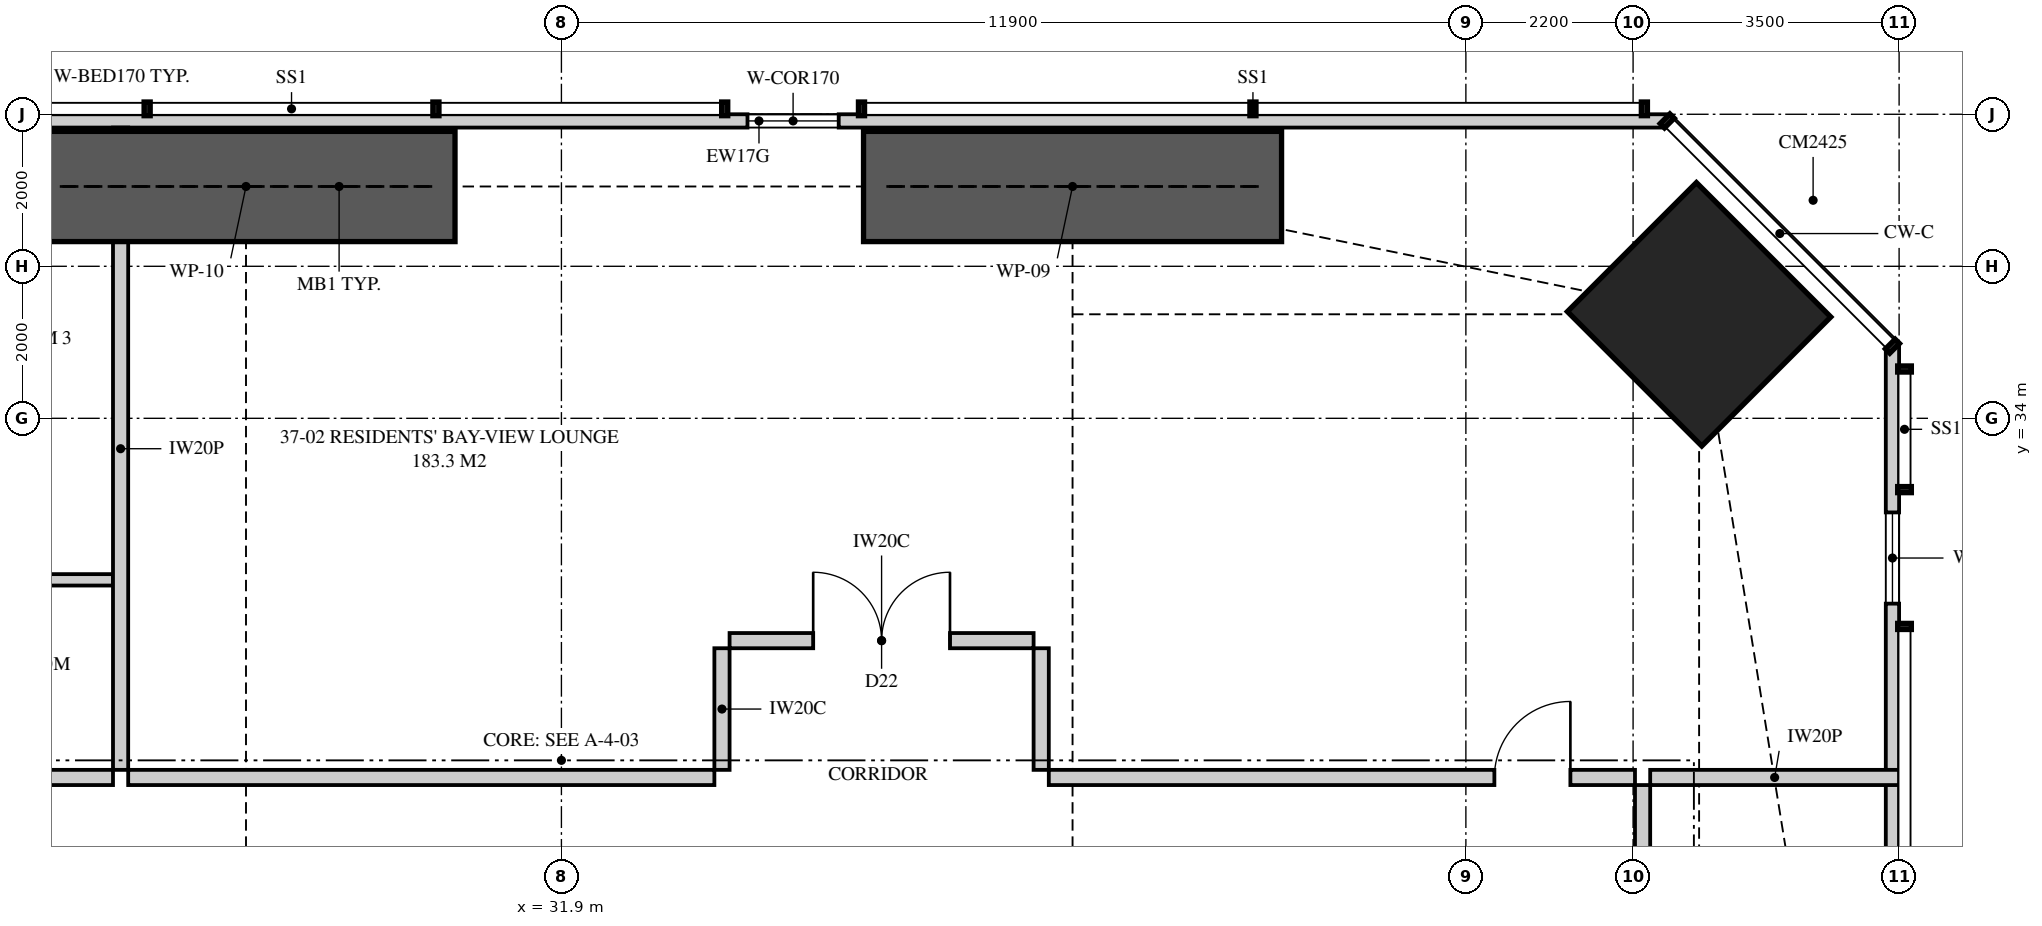
"""IFC4 building model, lengths in metres.
Left out: names, types, materials, properties, quantities, classifications, styles, units other than length and angle.
Written with IfcOpenShell. Run it as: python <this file> out.ifc"""

import sys

from ifc_helpers import new_model, si_unit, direction, frame, frame_2d, origin, origin_2d, place, context, subcontext, project, spatial, polyline, rectangle, outline, extrude, element, fill, save


model = new_model("IFC4")
c1 = context("Model", 3, precision=1e-05, world=origin(), true_north=direction((0.0, 1.0)))
c2 = subcontext(c1, "Body", "Model", "MODEL_VIEW")
j1 = project(units=[si_unit("LENGTHUNIT", "METRE"), si_unit("PLANEANGLEUNIT", "RADIAN")], contexts=[c1])
p1 = place(None, origin())
s1 = spatial("IfcSite", under=j1, at=p1, CompositionType="ELEMENT")
p2 = place(p1, origin())
s2 = spatial("IfcBuilding", under=s1, at=p2, CompositionType="ELEMENT")
p3 = place(p2, frame((0.0, 0.0, 135.0)))
s3 = spatial("IfcBuildingStorey", under=s2, at=p3, CompositionType="ELEMENT", Elevation=135.0)
p4 = place(p3, frame((46.869, 35.369, 0.0), z_axis=(0.0, 0.0, 1.0), x_axis=(-0.707106781187, -0.707106781187, 0.0)))
e1 = element("IfcColumn", 1, at=p4, inside=s3, PredefinedType="COLUMN", context=c2, shape_type="SweptSolid", body=[
    extrude(rectangle(XDim=2.4, YDim=2.5, at=origin_2d()), origin(), (0.0, 0.0, 1.0), 3.35),
])
p5 = place(p3, frame((49.413, 3.051, 0.0), z_axis=(0.0, 0.0, 1.0), x_axis=(0.0, 1.0, 0.0)))
e2 = element("IfcWall", 2, at=p5, inside=s3, PredefinedType="SOLIDWALL", context=c2, shape_type="SweptSolid", body=[
    extrude(outline(polyline([(0.0, 0.0), (31.897, 0.0), (31.897, 3.11), (22.167, 3.11), (22.167, 2.15), (22.074, 2.15), (22.074, 3.11), (21.949, 3.11), (21.949, 2.15), (9.949, 2.15), (9.949, 3.11), (9.823, 3.11), (9.823, 2.15), (9.73, 2.15), (9.73, 3.11), (0.0, 3.11), (0.0, 0.0)])), frame((0.0, 0.087, 0.0), z_axis=(0.0, -1.0, 0.0), x_axis=(1.0, 0.0, 0.0)), (0.0, 0.0, 1.0), 0.175),
])
p6 = place(p5, frame((2.118, 0.0, 0.4)))
e3 = element("IfcOpeningElement", 3, at=p6, cuts=e2, PredefinedType="OPENING", context=c2, shape_type="SweptSolid", body=[
    extrude(rectangle(XDim=1.8, YDim=1.7, at=frame_2d((0.9, 0.85))), frame((0.0, 0.097, 0.0), z_axis=(0.0, -1.0, 0.0), x_axis=(1.0, 0.0, 0.0)), (0.0, 0.0, 1.0), 0.195),
])
p7 = place(p5, frame((14.849, 0.0, 0.4)))
e4 = element("IfcOpeningElement", 4, at=p7, cuts=e2, PredefinedType="OPENING", context=c2, shape_type="SweptSolid", body=[
    extrude(rectangle(XDim=1.2, YDim=1.7, at=frame_2d((0.6, 0.85))), frame((0.0, 0.097, 0.0), z_axis=(0.0, -1.0, 0.0), x_axis=(1.0, 0.0, 0.0)), (0.0, 0.0, 1.0), 0.195),
])
p8 = place(p5, frame((28.51, 0.0, 0.4)))
e5 = element("IfcOpeningElement", 5, at=p8, cuts=e2, PredefinedType="OPENING", context=c2, shape_type="SweptSolid", body=[
    extrude(rectangle(XDim=1.2, YDim=1.7, at=frame_2d((0.6, 0.85))), frame((0.0, 0.097, 0.0), z_axis=(0.0, -1.0, 0.0), x_axis=(1.0, 0.0, 0.0)), (0.0, 0.0, 1.0), 0.195),
])
p9 = place(p3, frame((46.449, 37.913, 0.0), z_axis=(0.0, 0.0, 1.0), x_axis=(-1.0, 0.0, 0.0)))
e6 = element("IfcWall", 6, at=p9, inside=s3, PredefinedType="SOLIDWALL", context=c2, shape_type="SweptSolid", body=[
    extrude(outline(polyline([(0.0, 0.0), (23.899, 0.0), (23.899, 2.15), (7.824, 2.15), (7.824, 3.11), (7.666, 3.11), (7.666, 2.15), (7.62, 2.15), (7.62, 3.11), (0.0, 3.11), (0.0, 0.0)])), frame((0.0, 0.087, 0.0), z_axis=(0.0, -1.0, 0.0), x_axis=(1.0, 0.0, 0.0)), (0.0, 0.0, 1.0), 0.175),
])
p10 = place(p9, frame((10.9, 0.0, 0.4)))
e7 = element("IfcOpeningElement", 7, at=p10, cuts=e6, PredefinedType="OPENING", context=c2, shape_type="SweptSolid", body=[
    extrude(rectangle(XDim=1.2, YDim=1.7, at=frame_2d((0.6, 0.85))), frame((0.0, 0.097, 0.0), z_axis=(0.0, -1.0, 0.0), x_axis=(1.0, 0.0, 0.0)), (0.0, 0.0, 1.0), 0.195),
])
p11 = place(p9, frame((21.559, 0.0, 0.4)))
e8 = element("IfcOpeningElement", 8, at=p11, cuts=e6, PredefinedType="OPENING", context=c2, shape_type="SweptSolid", body=[
    extrude(rectangle(XDim=1.8, YDim=1.7, at=frame_2d((0.9, 0.85))), frame((0.0, 0.097, 0.0), z_axis=(0.0, -1.0, 0.0), x_axis=(1.0, 0.0, 0.0)), (0.0, 0.0, 1.0), 0.195),
])
p12 = place(p3, frame((26.1, 37.825, 0.0), z_axis=(0.0, 0.0, 1.0), x_axis=(0.0, -1.0, 0.0)))
e9 = element("IfcWall", 9, at=p12, inside=s3, PredefinedType="PARTITIONING", context=c2, shape_type="SweptSolid", body=[
    extrude(outline(polyline([(0.529, 2.15), (0.0, 2.15), (0.0, 0.0), (0.529, 0.0), (0.529, 0.376), (1.021, 0.376), (1.021, 0.0), (8.45, 0.0), (8.45, 3.11), (1.685, 3.11), (1.685, 2.15), (1.021, 2.15), (1.021, 1.774), (0.529, 1.774), (0.529, 2.15)])), frame((0.0, 0.1, 0.0), z_axis=(0.0, -1.0, 0.0), x_axis=(1.0, 0.0, 0.0)), (0.0, 0.0, 1.0), 0.2),
])
p13 = place(p3, frame((17.775, 29.275, 0.0), z_axis=(0.0, 0.0, 1.0), x_axis=(1.0, 0.0, 0.0)))
e10 = element("IfcWall", 10, at=p13, inside=s3, PredefinedType="PARTITIONING", context=c2, shape_type="SweptSolid", body=[
    extrude(rectangle(XDim=8.225, YDim=0.2, at=frame_2d((4.113, 0.0))), origin(), (0.0, 0.0, 1.0), 3.11),
])
p14 = place(p13, frame((0.2, 0.0, 0.0)))
e11 = element("IfcOpeningElement", 11, at=p14, cuts=e10, PredefinedType="OPENING", context=c2, shape_type="SweptSolid", body=[
    extrude(rectangle(XDim=1.05, YDim=2.2, at=frame_2d((0.525, 1.1))), frame((0.0, 0.11, 0.0), z_axis=(0.0, -1.0, 0.0), x_axis=(1.0, 0.0, 0.0)), (0.0, 0.0, 1.0), 0.22),
])
p15 = place(p3, frame((22.65, 31.875, 0.0), z_axis=(0.0, 0.0, 1.0), x_axis=(1.0, 0.0, 0.0)))
e12 = element("IfcWall", 12, at=p15, inside=s3, PredefinedType="PLUMBINGWALL", context=c2, shape_type="SweptSolid", body=[
    extrude(rectangle(XDim=3.35, YDim=0.15, at=frame_2d((1.675, 0.0))), origin(), (0.0, 0.0, 1.0), 3.11),
])
p16 = place(p3, frame((26.2, 29.275, 0.0), z_axis=(0.0, 0.0, 1.0), x_axis=(1.0, 0.0, 0.0)))
e13 = element("IfcWall", 13, at=p16, inside=s3, PredefinedType="PARTITIONING", context=c2, shape_type="SweptSolid", body=[
    extrude(outline(polyline([(0.0, 0.0), (7.713, 0.0), (7.712, 3.11), (1.887, 3.11), (1.887, 2.541), (1.213, 2.541), (1.213, 3.11), (0.0, 3.11), (0.0, 0.0)])), frame((0.0, 0.1, 0.0), z_axis=(0.0, -1.0, 0.0), x_axis=(1.0, 0.0, 0.0)), (0.0, 0.0, 1.0), 0.2),
])
p17 = place(p3, frame((46.225, 29.275, 0.0), z_axis=(0.0, 0.0, 1.0), x_axis=(1.0, 0.0, 0.0)))
e14 = element("IfcWall", 14, at=p17, inside=s3, PredefinedType="PARTITIONING", context=c2, shape_type="SweptSolid", body=[
    extrude(outline(polyline([(0.0, 0.0), (3.275, 0.0), (3.275, 3.11), (2.554, 3.11), (2.554, 2.15), (0.805, 2.15), (0.805, 2.541), (0.306, 2.541), (0.306, 3.11), (0.0, 3.11), (0.0, 0.0)])), frame((0.0, 0.1, 0.0), z_axis=(0.0, -1.0, 0.0), x_axis=(1.0, 0.0, 0.0)), (0.0, 0.0, 1.0), 0.2),
])
p18 = place(p3, frame((46.125, 7.825, 0.0), z_axis=(0.0, 0.0, 1.0), x_axis=(0.0, 1.0, 0.0)))
e15 = element("IfcWall", 15, at=p18, inside=s3, PredefinedType="PARTITIONING", context=c2, shape_type="SweptSolid", body=[
    extrude(outline(polyline([(0.0, 0.0), (21.35, 0.0), (21.35, 3.11), (17.512, 3.11), (17.512, 2.541), (16.838, 2.541), (16.838, 3.11), (5.512, 3.11), (5.512, 2.541), (4.838, 2.541), (4.838, 3.11), (0.0, 3.11), (0.0, 0.0)])), frame((0.0, 0.1, 0.0), z_axis=(0.0, -1.0, 0.0), x_axis=(1.0, 0.0, 0.0)), (0.0, 0.0, 1.0), 0.2),
])
p19 = place(p18, frame((9.775, 0.0, 0.0)))
e16 = element("IfcOpeningElement", 16, at=p19, cuts=e15, PredefinedType="OPENING", context=c2, shape_type="SweptSolid", body=[
    extrude(rectangle(XDim=1.8, YDim=2.1, at=frame_2d((0.9, 1.05))), frame((0.0, 0.11, 0.0), z_axis=(0.0, -1.0, 0.0), x_axis=(1.0, 0.0, 0.0)), (0.0, 0.0, 1.0), 0.22),
])
p20 = place(p18, frame((19.5, 0.0, 0.0)))
e17 = element("IfcOpeningElement", 17, at=p20, cuts=e15, PredefinedType="OPENING", context=c2, shape_type="SweptSolid", body=[
    extrude(rectangle(XDim=1.0, YDim=2.1, at=frame_2d((0.5, 1.05))), frame((0.0, 0.11, 0.0), z_axis=(0.0, -1.0, 0.0), x_axis=(1.0, 0.0, 0.0)), (0.0, 0.0, 1.0), 0.22),
])
p21 = place(p3, frame((38.312, 29.275, 0.0), z_axis=(0.0, 0.0, 1.0), x_axis=(1.0, 0.0, 0.0)))
e18 = element("IfcWall", 18, at=p21, inside=s3, PredefinedType="PARTITIONING", context=c2, shape_type="SweptSolid", body=[
    extrude(outline(polyline([(0.0, 0.0), (7.712, 0.0), (7.712, 3.11), (0.65, 3.11), (0.65, 2.541), (0.0, 2.541), (0.0, 3.11), (0.0, 0.0)])), frame((0.0, 0.1, 0.0), z_axis=(0.0, -1.0, 0.0), x_axis=(1.0, 0.0, 0.0)), (0.0, 0.0, 1.0), 0.2),
])
p22 = place(p21, frame((5.863, 0.0, 0.0)))
e19 = element("IfcOpeningElement", 19, at=p22, cuts=e18, PredefinedType="OPENING", context=c2, shape_type="SweptSolid", body=[
    extrude(rectangle(XDim=1.0, YDim=2.1, at=frame_2d((0.5, 1.05))), frame((0.0, 0.11, 0.0), z_axis=(0.0, -1.0, 0.0), x_axis=(1.0, 0.0, 0.0)), (0.0, 0.0, 1.0), 0.22),
])
p23 = place(p3, frame((34.113, 31.075, 0.0), z_axis=(0.0, 0.0, 1.0), x_axis=(1.0, 0.0, 0.0)))
e20 = element("IfcWall", 20, at=p23, inside=s3, PredefinedType="PARTITIONING", context=c2, shape_type="SweptSolid", body=[
    extrude(rectangle(XDim=4.0, YDim=0.2, at=frame_2d((2.0, 0.0))), origin(), (0.0, 0.0, 1.0), 3.11),
])
p24 = place(p23, frame((1.1, 0.0, 0.0)))
e21 = element("IfcOpeningElement", 21, at=p24, cuts=e20, PredefinedType="OPENING", context=c2, shape_type="SweptSolid", body=[
    extrude(rectangle(XDim=1.8, YDim=2.1, at=frame_2d((0.9, 1.05))), frame((0.0, 0.11, 0.0), z_axis=(0.0, -1.0, 0.0), x_axis=(1.0, 0.0, 0.0)), (0.0, 0.0, 1.0), 0.22),
])
for number, where, z_axis, x_axis in (
    (22, (34.012, 29.375, 0.0), (0.0, 0.0, 1.0), (0.0, 1.0, 0.0)),
    (23, (38.212, 29.375, 0.0), (0.0, 0.0, 1.0), (0.0, 1.0, 0.0)),
):
    element("IfcWall", number, at=place(p3, frame(where, z_axis=z_axis, x_axis=x_axis)), inside=s3, PredefinedType="PARTITIONING", context=c2, shape_type="SweptSolid", body=[
        extrude(rectangle(XDim=1.6, YDim=0.2, at=frame_2d((0.8, 0.0))), origin(), (0.0, 0.0, 1.0), 3.11),
    ])
for number, where, z_axis, x_axis in (
    (24, (35.875, 37.05, 0.0), (0.0, 0.0, 1.0), (1.0, 0.0, 0.0)),
    (25, (25.0, 37.05, 0.0), (0.0, 0.0, 1.0), (1.0, 0.0, 0.0)),
):
    element("IfcWall", number, at=place(p3, frame(where, z_axis=z_axis, x_axis=x_axis)), inside=s3, PredefinedType="SHEAR", context=c2, shape_type="SweptSolid", body=[
        extrude(rectangle(XDim=5.5, YDim=1.45, at=frame_2d((2.75, 0.0))), origin(), (0.0, 0.0, 1.0), 3.35),
    ])
p25 = place(p8, origin())
e26 = element("IfcWindow", 26, at=p25, inside=s3, PartitioningType="SINGLE_PANEL", PredefinedType="WINDOW", context=c2, shape_type="SweptSolid", body=[
    extrude(rectangle(XDim=1.2, YDim=1.7, at=frame_2d((0.6, 0.85))), frame((0.0, 0.03, 0.0), z_axis=(0.0, -1.0, 0.0), x_axis=(1.0, 0.0, 0.0)), (0.0, 0.0, 1.0), 0.06),
])
fill(e5, e26)
p26 = place(p10, origin())
e27 = element("IfcWindow", 27, at=p26, inside=s3, PartitioningType="SINGLE_PANEL", PredefinedType="WINDOW", context=c2, shape_type="SweptSolid", body=[
    extrude(rectangle(XDim=1.2, YDim=1.7, at=frame_2d((0.6, 0.85))), frame((0.0, 0.03, 0.0), z_axis=(0.0, -1.0, 0.0), x_axis=(1.0, 0.0, 0.0)), (0.0, 0.0, 1.0), 0.06),
])
fill(e7, e27)
p27 = place(p24, origin())
e28 = element("IfcDoor", 28, at=p27, inside=s3, OperationType="DOUBLE_DOOR_SINGLE_SWING", PredefinedType="DOOR", context=c2, shape_type="SweptSolid", body=[
    extrude(rectangle(XDim=1.8, YDim=2.1, at=frame_2d((0.9, 1.05))), frame((0.0, 0.025, 0.0), z_axis=(0.0, -1.0, 0.0), x_axis=(1.0, 0.0, 0.0)), (0.0, 0.0, 1.0), 0.05),
])
fill(e21, e28)
p28 = place(p22, origin())
e29 = element("IfcDoor", 29, at=p28, inside=s3, OperationType="SINGLE_SWING_RIGHT", PredefinedType="DOOR", context=c2, shape_type="SweptSolid", body=[
    extrude(rectangle(XDim=1.0, YDim=2.1, at=frame_2d((0.5, 1.05))), frame((0.0, 0.025, 0.0), z_axis=(0.0, -1.0, 0.0), x_axis=(1.0, 0.0, 0.0)), (0.0, 0.0, 1.0), 0.05),
])
fill(e19, e29)
save(model, sys.argv[1])
